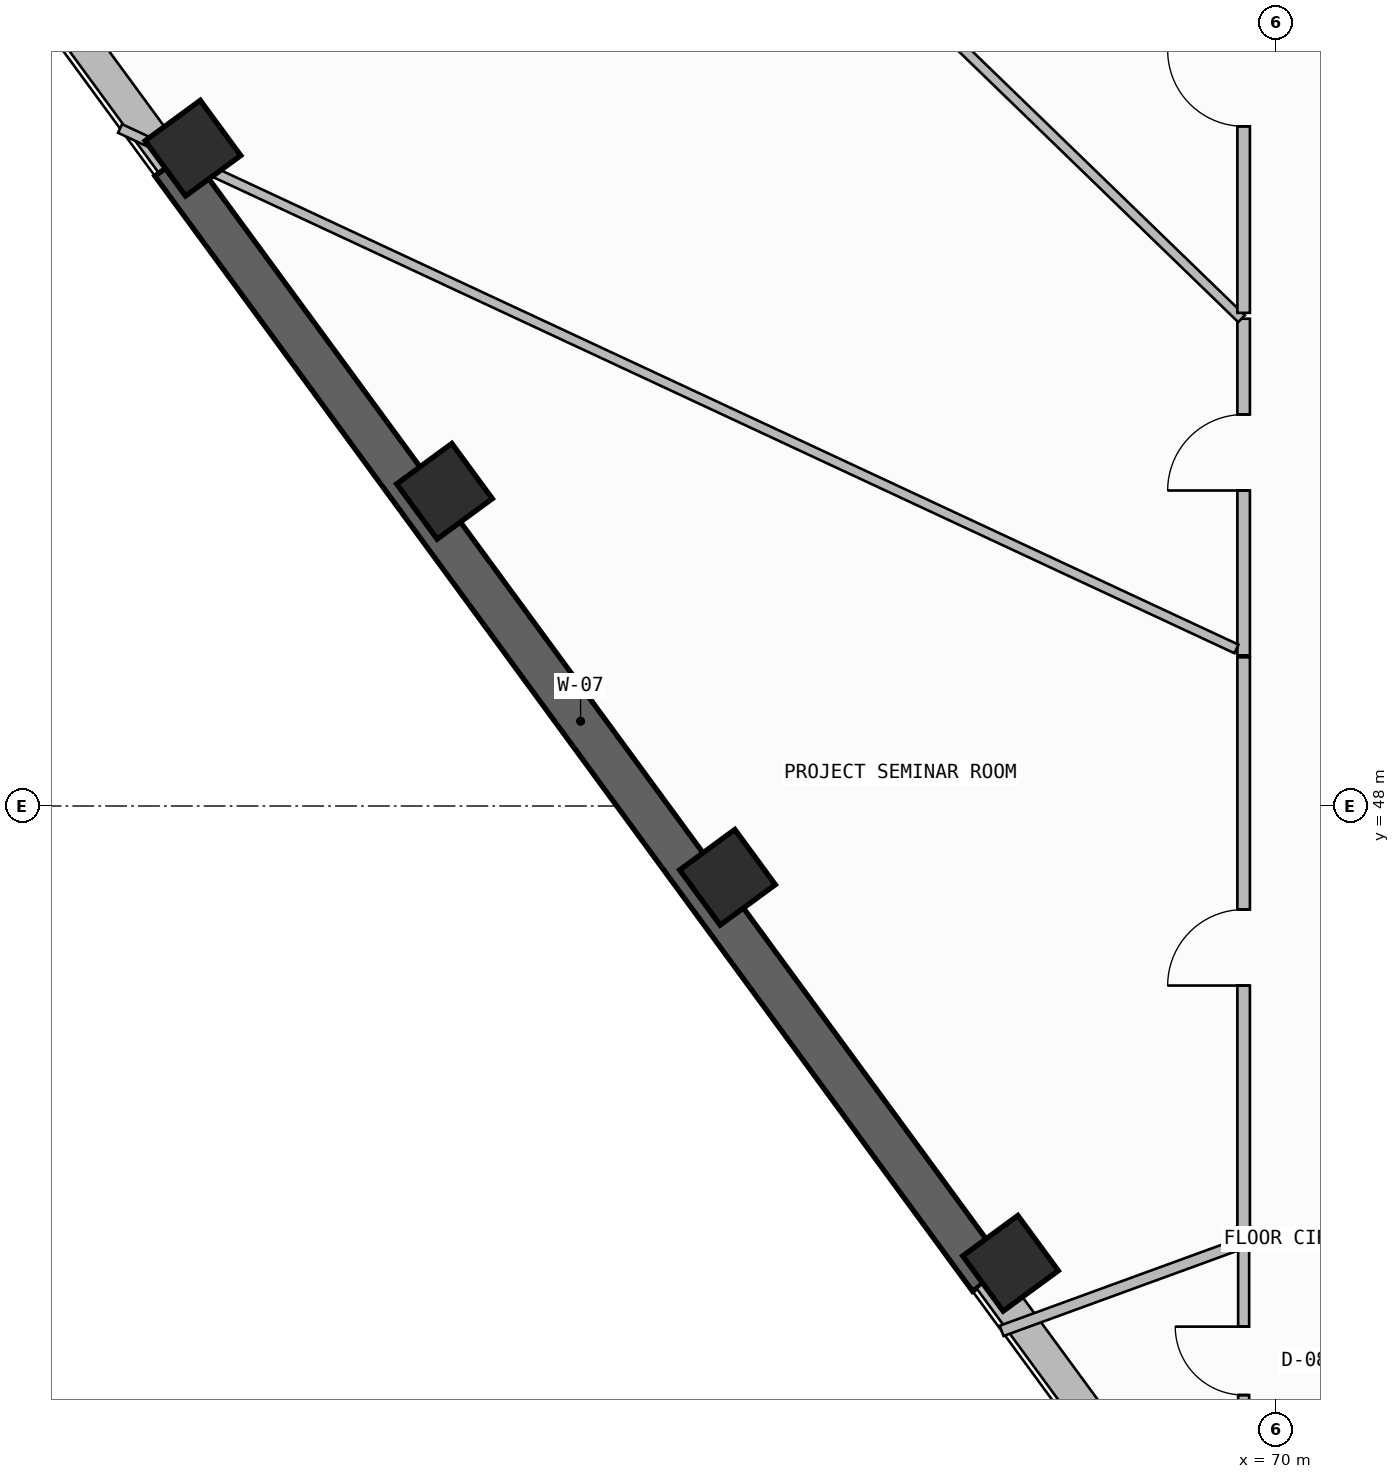
"""IFC4 building model, lengths in metres.
Left out: names, types, materials, properties, quantities, classifications, styles, units other than length and angle.
Written with IfcOpenShell. Run it as: python <this file> out.ifc"""

import sys

from ifc_helpers import new_model, si_unit, direction, frame, frame_2d, origin, origin_2d, place, context, subcontext, project, spatial, rectangle, extrude, element, fill, save


model = new_model("IFC4")
c1 = context("Model", 3, precision=1e-05, world=origin(), true_north=direction((0.0, 1.0)))
c2 = subcontext(c1, "Body", "Model", "MODEL_VIEW")
j1 = project(units=[si_unit("LENGTHUNIT", "METRE"), si_unit("PLANEANGLEUNIT", "RADIAN")], contexts=[c1])
p1 = place(None, origin())
s1 = spatial("IfcSite", under=j1, at=p1, CompositionType="ELEMENT")
p2 = place(p1, origin())
s2 = spatial("IfcBuilding", under=s1, at=p2, CompositionType="ELEMENT")
p3 = place(p2, frame((0.0, 0.0, 260.74)))
s3 = spatial("IfcBuildingStorey", under=s2, at=p3, CompositionType="ELEMENT", Elevation=260.74)
for number, where, z_axis, x_axis in (
    (1, (55.753, 56.654, 0.0), (0.0, 0.0, 1.0), (-0.591, 0.806, 0.0)),
    (2, (59.063, 52.14, 0.0), (0.0, 0.0, 1.0), (-0.591, 0.806, 0.0)),
    (3, (62.787, 47.062, 0.0), (0.0, 0.0, 1.0), (-0.591, 0.806, 0.0)),
    (4, (66.51, 41.983, 0.0), (0.0, 0.0, 1.0), (-0.591, 0.806, 0.0)),
):
    element("IfcColumn", number, at=place(p3, frame(where, z_axis=z_axis, x_axis=x_axis)), inside=s3, PredefinedType="COLUMN", context=c2, shape_type="SweptSolid", body=[
        extrude(rectangle(XDim=0.9, YDim=0.9, at=origin_2d()), origin(), (0.0, 0.0, 1.0), 3.52),
    ])
p4 = place(p3, frame((52.579, 60.4, 0.0), z_axis=(0.0, 0.0, 1.0), x_axis=(0.591311800505, -0.806443026248, 0.0)))
e5 = element("IfcWall", 5, at=p4, inside=s3, PredefinedType="SOLIDWALL", context=c2, shape_type="SweptSolid", body=[
    extrude(rectangle(XDim=4.898, YDim=0.42, at=frame_2d((2.449, 0.0))), origin(), (0.0, 0.0, 1.0), 2.237),
])
p5 = place(p3, frame((55.475, 56.45, -0.26), z_axis=(0.0, 0.0, 1.0), x_axis=(0.591309555876, -0.806444672082, 0.0)))
e6 = element("IfcWall", 6, at=p5, inside=s3, PredefinedType="SHEAR", context=c2, shape_type="SweptSolid", body=[
    extrude(rectangle(XDim=18.192, YDim=0.55, at=frame_2d((9.096, 0.0))), origin(), (0.0, 0.0, 1.0), 3.52),
])
p6 = place(p3, frame((66.232, 41.779, 0.0), z_axis=(0.0, 0.0, 1.0), x_axis=(0.591309008949, -0.806445073105, 0.0)))
e7 = element("IfcWall", 7, at=p6, inside=s3, PredefinedType="SOLIDWALL", context=c2, shape_type="SweptSolid", body=[
    extrude(rectangle(XDim=8.908, YDim=0.42, at=frame_2d((4.454, 0.0))), origin(), (0.0, 0.0, 1.0), 2.237),
])
p7 = place(p6, frame((3.549, 0.0, 0.957)))
e8 = element("IfcOpeningElement", 8, at=p7, cuts=e7, PredefinedType="OPENING", context=c2, shape_type="SweptSolid", body=[
    extrude(rectangle(XDim=2.4, YDim=1.2, at=frame_2d((1.2, 0.6))), frame((0.0, 0.22, 0.0), z_axis=(0.0, -1.0, 0.0), x_axis=(1.0, 0.0, 0.0)), (0.0, 0.0, 1.0), 0.44),
])
p8 = place(p3, frame((69.578, 42.294, 0.0), z_axis=(0.0, 0.0, 1.0), x_axis=(0.0, -1.0, 0.0)))
e9 = element("IfcWall", 9, at=p8, inside=s3, PredefinedType="PARTITIONING", context=c2, shape_type="SweptSolid", body=[
    extrude(rectangle(XDim=2.752, YDim=0.145, at=frame_2d((1.376, 0.0))), origin(), (0.0, 0.0, 1.0), 3.26),
])
p9 = place(p8, frame((1.144, 0.0, 0.0)))
e10 = element("IfcOpeningElement", 10, at=p9, cuts=e9, PredefinedType="OPENING", context=c2, shape_type="SweptSolid", body=[
    extrude(rectangle(XDim=0.9, YDim=2.1, at=frame_2d((0.45, 1.05))), frame((0.0, 0.083, 0.0), z_axis=(0.0, -1.0, 0.0), x_axis=(1.0, 0.0, 0.0)), (0.0, 0.0, 1.0), 0.165),
])
p10 = place(p3, frame((66.393, 41.095, 0.0), z_axis=(0.0, 0.0, 1.0), x_axis=(0.939471141622, 0.342628040388, 0.0)))
e11 = element("IfcWall", 11, at=p10, inside=s3, PredefinedType="PARTITIONING", context=c2, shape_type="SweptSolid", body=[
    extrude(rectangle(XDim=3.3, YDim=0.145, at=frame_2d((1.65, 0.0))), origin(), (0.0, 0.0, 1.0), 2.237),
])
p11 = place(p3, frame((69.578, 54.411, 0.0), z_axis=(0.0, 0.0, 1.0), x_axis=(0.0, -1.0, 0.0)))
e12 = element("IfcWall", 12, at=p11, inside=s3, PredefinedType="PARTITIONING", context=c2, shape_type="SweptSolid", body=[
    extrude(rectangle(XDim=4.428, YDim=0.165, at=frame_2d((2.214, 0.0))), origin(), (0.0, 0.0, 1.0), 2.237),
])
p12 = place(p11, frame((1.26, 0.0, 0.0)))
e13 = element("IfcOpeningElement", 13, at=p12, cuts=e12, PredefinedType="OPENING", context=c2, shape_type="SweptSolid", body=[
    extrude(rectangle(XDim=1.0, YDim=2.2, at=frame_2d((0.5, 1.1))), frame((0.0, 0.093, 0.0), z_axis=(0.0, -1.0, 0.0), x_axis=(1.0, 0.0, 0.0)), (0.0, 0.0, 1.0), 0.185),
])
p13 = place(p3, frame((60.275, 63.395, 0.0), z_axis=(0.0, 0.0, 1.0), x_axis=(0.718266500505, -0.695768089418, 0.0)))
e14 = element("IfcWall", 14, at=p13, inside=s3, PredefinedType="PARTITIONING", context=c2, shape_type="SweptSolid", body=[
    extrude(rectangle(XDim=12.913, YDim=0.125, at=frame_2d((6.457, 0.0))), origin(), (0.0, 0.0, 1.0), 2.237),
])
p14 = place(p3, frame((69.483, 50.066, 0.0), z_axis=(0.0, 0.0, 1.0), x_axis=(-0.906367788561, 0.422489564202, 0.0)))
e15 = element("IfcWall", 15, at=p14, inside=s3, PredefinedType="PARTITIONING", context=c2, shape_type="SweptSolid", body=[
    extrude(rectangle(XDim=16.206, YDim=0.125, at=frame_2d((8.103, 0.0))), origin(), (0.0, 0.0, 1.0), 2.237),
])
p15 = place(p3, frame((69.578, 58.778, 0.0), z_axis=(0.0, 0.0, 1.0), x_axis=(0.0, -1.0, 0.0)))
e16 = element("IfcWall", 16, at=p15, inside=s3, PredefinedType="PARTITIONING", context=c2, shape_type="SweptSolid", body=[
    extrude(rectangle(XDim=4.29, YDim=0.165, at=frame_2d((2.145, 0.0))), origin(), (0.0, 0.0, 1.0), 2.237),
])
p16 = place(p15, frame((0.836, 0.0, 0.0)))
e17 = element("IfcOpeningElement", 17, at=p16, cuts=e16, PredefinedType="OPENING", context=c2, shape_type="SweptSolid", body=[
    extrude(rectangle(XDim=1.0, YDim=2.2, at=frame_2d((0.5, 1.1))), frame((0.0, 0.093, 0.0), z_axis=(0.0, -1.0, 0.0), x_axis=(1.0, 0.0, 0.0)), (0.0, 0.0, 1.0), 0.185),
])
p17 = place(p3, frame((69.578, 49.956, 0.0), z_axis=(0.0, 0.0, 1.0), x_axis=(0.0, -1.0, 0.0)))
e18 = element("IfcWall", 18, at=p17, inside=s3, PredefinedType="PARTITIONING", context=c2, shape_type="SweptSolid", body=[
    extrude(rectangle(XDim=7.636, YDim=0.165, at=frame_2d((3.818, 0.0))), origin(), (0.0, 0.0, 1.0), 3.26),
])
p18 = place(p17, frame((3.318, 0.0, 0.0)))
e19 = element("IfcOpeningElement", 19, at=p18, cuts=e18, PredefinedType="OPENING", context=c2, shape_type="SweptSolid", body=[
    extrude(rectangle(XDim=1.0, YDim=2.2, at=frame_2d((0.5, 1.1))), frame((0.0, 0.093, 0.0), z_axis=(0.0, -1.0, 0.0), x_axis=(1.0, 0.0, 0.0)), (0.0, 0.0, 1.0), 0.185),
])
p19 = place(p9, frame((0.9, 0.0, 0.0), z_axis=(0.0, 0.0, 1.0), x_axis=(-1.0, 0.0, 0.0)))
e20 = element("IfcDoor", 20, at=p19, inside=s3, OperationType="SINGLE_SWING_RIGHT", PredefinedType="DOOR", context=c2, shape_type="SweptSolid", body=[
    extrude(rectangle(XDim=0.9, YDim=2.1, at=frame_2d((0.45, 1.05))), frame((0.0, 0.025, 0.0), z_axis=(0.0, -1.0, 0.0), x_axis=(1.0, 0.0, 0.0)), (0.0, 0.0, 1.0), 0.05),
])
fill(e10, e20)
p20 = place(p12, frame((1.0, 0.0, 0.0), z_axis=(0.0, 0.0, 1.0), x_axis=(-1.0, 0.0, 0.0)))
e21 = element("IfcDoor", 21, at=p20, inside=s3, OperationType="SINGLE_SWING_LEFT", PredefinedType="DOOR", context=c2, shape_type="SweptSolid", body=[
    extrude(rectangle(XDim=1.0, YDim=2.2, at=frame_2d((0.5, 1.1))), frame((0.0, 0.025, 0.0), z_axis=(0.0, -1.0, 0.0), x_axis=(1.0, 0.0, 0.0)), (0.0, 0.0, 1.0), 0.05),
])
fill(e13, e21)
p21 = place(p16, frame((1.0, 0.0, 0.0), z_axis=(0.0, 0.0, 1.0), x_axis=(-1.0, 0.0, 0.0)))
e22 = element("IfcDoor", 22, at=p21, inside=s3, OperationType="SINGLE_SWING_RIGHT", PredefinedType="DOOR", context=c2, shape_type="SweptSolid", body=[
    extrude(rectangle(XDim=1.0, YDim=2.2, at=frame_2d((0.5, 1.1))), frame((0.0, 0.025, 0.0), z_axis=(0.0, -1.0, 0.0), x_axis=(1.0, 0.0, 0.0)), (0.0, 0.0, 1.0), 0.05),
])
fill(e17, e22)
p22 = place(p18, frame((1.0, 0.0, 0.0), z_axis=(0.0, 0.0, 1.0), x_axis=(-1.0, 0.0, 0.0)))
e23 = element("IfcDoor", 23, at=p22, inside=s3, OperationType="SINGLE_SWING_LEFT", PredefinedType="DOOR", context=c2, shape_type="SweptSolid", body=[
    extrude(rectangle(XDim=1.0, YDim=2.2, at=frame_2d((0.5, 1.1))), frame((0.0, 0.025, 0.0), z_axis=(0.0, -1.0, 0.0), x_axis=(1.0, 0.0, 0.0)), (0.0, 0.0, 1.0), 0.05),
])
fill(e19, e23)
save(model, sys.argv[1])
